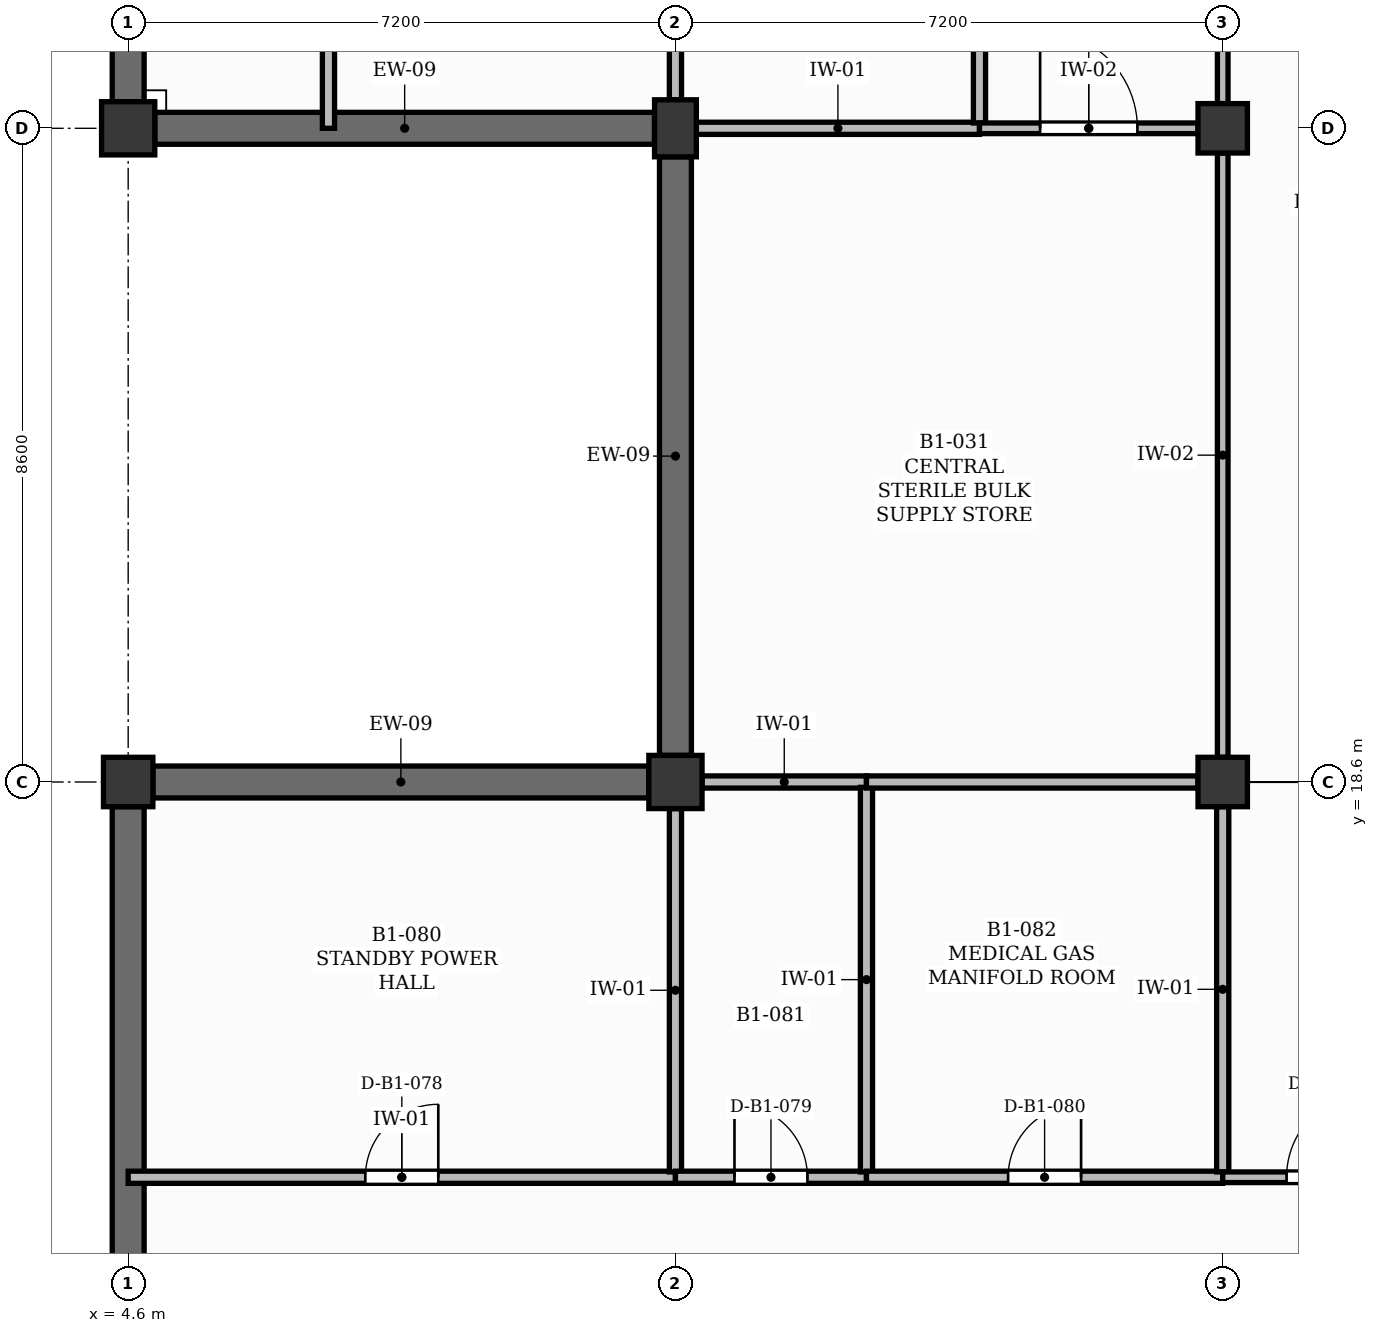
"""IFC4 building model, lengths in metres.
Left out: names, types, materials, properties, quantities, classifications, styles, units other than length and angle.
Written with IfcOpenShell. Run it as: python <this file> out.ifc"""

import sys

from ifc_helpers import new_model, si_unit, direction, frame, frame_2d, origin, origin_2d, place, context, subcontext, project, spatial, rectangle, extrude, element, fill, save


model = new_model("IFC4")
c1 = context("Model", 3, precision=1e-05, world=origin(), true_north=direction((0.0, 1.0)))
c2 = subcontext(c1, "Body", "Model", "MODEL_VIEW")
j1 = project(units=[si_unit("LENGTHUNIT", "METRE"), si_unit("PLANEANGLEUNIT", "RADIAN")], contexts=[c1])
p1 = place(None, origin())
s1 = spatial("IfcSite", under=j1, at=p1, CompositionType="ELEMENT")
p2 = place(p1, origin())
s2 = spatial("IfcBuilding", under=s1, at=p2, CompositionType="ELEMENT")
p3 = place(p2, frame((0.0, 0.0, -4.5)))
s3 = spatial("IfcBuildingStorey", under=s2, at=p3, CompositionType="ELEMENT", Elevation=-4.5)
p4 = place(p3, frame((4.6, 18.6, 0.0), z_axis=(0.0, 0.0, 1.0), x_axis=(1.0, 0.0, 0.0)))
e1 = element("IfcColumn", 1, at=p4, inside=s3, PredefinedType="COLUMN", context=c2, shape_type="SweptSolid", body=[
    extrude(rectangle(XDim=0.65, YDim=0.65, at=origin_2d()), origin(), (0.0, 0.0, 1.0), 4.2),
])
for number, where, z_axis, x_axis in (
    (2, (4.6, 27.2, 0.0), (0.0, 0.0, 1.0), (1.0, 0.0, 0.0)),
    (3, (11.8, 18.6, 0.0), (0.0, 0.0, 1.0), (1.0, 0.0, 0.0)),
):
    element("IfcColumn", number, at=place(p3, frame(where, z_axis=z_axis, x_axis=x_axis)), inside=s3, PredefinedType="COLUMN", context=c2, shape_type="SweptSolid", body=[
        extrude(rectangle(XDim=0.7, YDim=0.7, at=origin_2d()), origin(), (0.0, 0.0, 1.0), 4.2),
    ])
p5 = place(p3, frame((11.8, 27.2, 0.0), z_axis=(0.0, 0.0, 1.0), x_axis=(1.0, 0.0, 0.0)))
e4 = element("IfcColumn", 4, at=p5, inside=s3, PredefinedType="COLUMN", context=c2, shape_type="SweptSolid", body=[
    extrude(rectangle(XDim=0.55, YDim=0.75, at=origin_2d()), origin(), (0.0, 0.0, 1.0), 4.2),
])
for number, where, z_axis, x_axis in (
    (5, (19.0, 18.6, 0.0), (0.0, 0.0, 1.0), (1.0, 0.0, 0.0)),
    (6, (19.0, 27.2, 0.0), (0.0, 0.0, 1.0), (1.0, 0.0, 0.0)),
):
    element("IfcColumn", number, at=place(p3, frame(where, z_axis=z_axis, x_axis=x_axis)), inside=s3, PredefinedType="COLUMN", context=c2, shape_type="SweptSolid", body=[
        extrude(rectangle(XDim=0.65, YDim=0.65, at=origin_2d()), origin(), (0.0, 0.0, 1.0), 4.2),
    ])
p6 = place(p3, frame((4.925, 18.6, 0.0), z_axis=(0.0, 0.0, 1.0), x_axis=(1.0, 0.0, 0.0)))
e7 = element("IfcWall", 7, at=p6, inside=s3, PredefinedType="USERDEFINED", context=c2, shape_type="SweptSolid", body=[
    extrude(rectangle(XDim=6.525, YDim=0.42, at=frame_2d((3.262, 0.0))), origin(), (0.0, 0.0, 1.0), 4.2),
])
p7 = place(p3, frame((4.6, 11.725, 0.0), z_axis=(0.0, 0.0, 1.0), x_axis=(0.0, 1.0, 0.0)))
e8 = element("IfcWall", 8, at=p7, inside=s3, PredefinedType="USERDEFINED", context=c2, shape_type="SweptSolid", body=[
    extrude(rectangle(XDim=6.55, YDim=0.42, at=frame_2d((3.275, 0.0))), origin(), (0.0, 0.0, 1.0), 4.2),
])
p8 = place(p3, frame((4.95, 27.2, 0.0), z_axis=(0.0, 0.0, 1.0), x_axis=(1.0, 0.0, 0.0)))
e9 = element("IfcWall", 9, at=p8, inside=s3, PredefinedType="USERDEFINED", context=c2, shape_type="SweptSolid", body=[
    extrude(rectangle(XDim=6.575, YDim=0.42, at=frame_2d((3.288, 0.0))), origin(), (0.0, 0.0, 1.0), 4.2),
])
p9 = place(p3, frame((4.6, 27.55, 0.0), z_axis=(0.0, 0.0, 1.0), x_axis=(0.0, 1.0, 0.0)))
e10 = element("IfcWall", 10, at=p9, inside=s3, PredefinedType="USERDEFINED", context=c2, shape_type="SweptSolid", body=[
    extrude(rectangle(XDim=8.925, YDim=0.42, at=frame_2d((4.462, 0.0))), origin(), (0.0, 0.0, 1.0), 4.2),
])
p10 = place(p3, frame((11.8, 18.95, 0.0), z_axis=(0.0, 0.0, 1.0), x_axis=(0.0, 1.0, 0.0)))
e11 = element("IfcWall", 11, at=p10, inside=s3, PredefinedType="USERDEFINED", context=c2, shape_type="SweptSolid", body=[
    extrude(rectangle(XDim=7.875, YDim=0.42, at=frame_2d((3.938, 0.0))), origin(), (0.0, 0.0, 1.0), 4.2),
])
p11 = place(p3, frame((4.6, 13.4, 0.0), z_axis=(0.0, 0.0, 1.0), x_axis=(1.0, 0.0, 0.0)))
e12 = element("IfcWall", 12, at=p11, inside=s3, PredefinedType="PARTITIONING", context=c2, shape_type="SweptSolid", body=[
    extrude(rectangle(XDim=7.2, YDim=0.16, at=frame_2d((3.6, 0.0))), origin(), (0.0, 0.0, 1.0), 4.08),
])
p12 = place(p11, frame((3.12, 0.0, 0.0)))
e13 = element("IfcOpeningElement", 13, at=p12, cuts=e12, PredefinedType="OPENING", context=c2, shape_type="SweptSolid", body=[
    extrude(rectangle(XDim=0.96, YDim=2.1, at=frame_2d((0.48, 1.05))), frame((0.0, 0.09, 0.0), z_axis=(0.0, -1.0, 0.0), x_axis=(1.0, 0.0, 0.0)), (0.0, 0.0, 1.0), 0.18),
])
p13 = place(p3, frame((7.235, 27.2, 0.0), z_axis=(0.0, 0.0, 1.0), x_axis=(0.0, 1.0, 0.0)))
e14 = element("IfcWall", 14, at=p13, inside=s3, PredefinedType="PARTITIONING", context=c2, shape_type="SweptSolid", body=[
    extrude(rectangle(XDim=8.23, YDim=0.16, at=frame_2d((4.115, 0.0))), origin(), (0.0, 0.0, 1.0), 4.08),
])
p14 = place(p3, frame((11.8, 13.47, 0.0), z_axis=(0.0, 0.0, 1.0), x_axis=(0.0, 1.0, 0.0)))
e15 = element("IfcWall", 15, at=p14, inside=s3, PredefinedType="PARTITIONING", context=c2, shape_type="SweptSolid", body=[
    extrude(rectangle(XDim=4.78, YDim=0.16, at=frame_2d((2.39, 0.0))), origin(), (0.0, 0.0, 1.0), 3.5),
])
p15 = place(p3, frame((11.8, 13.4, 0.0), z_axis=(0.0, 0.0, 1.0), x_axis=(1.0, 0.0, 0.0)))
e16 = element("IfcWall", 16, at=p15, inside=s3, PredefinedType="PARTITIONING", context=c2, shape_type="SweptSolid", body=[
    extrude(rectangle(XDim=2.513, YDim=0.16, at=frame_2d((1.256, 0.0))), origin(), (0.0, 0.0, 1.0), 4.08),
])
p16 = place(p15, frame((0.777, 0.0, 0.0)))
e17 = element("IfcOpeningElement", 17, at=p16, cuts=e16, PredefinedType="OPENING", context=c2, shape_type="SweptSolid", body=[
    extrude(rectangle(XDim=0.96, YDim=2.1, at=frame_2d((0.48, 1.05))), frame((0.0, 0.09, 0.0), z_axis=(0.0, -1.0, 0.0), x_axis=(1.0, 0.0, 0.0)), (0.0, 0.0, 1.0), 0.18),
])
p17 = place(p3, frame((12.15, 18.6, 0.0), z_axis=(0.0, 0.0, 1.0), x_axis=(1.0, 0.0, 0.0)))
e18 = element("IfcWall", 18, at=p17, inside=s3, PredefinedType="PARTITIONING", context=c2, shape_type="SweptSolid", body=[
    extrude(rectangle(XDim=2.163, YDim=0.16, at=frame_2d((1.082, 0.0))), origin(), (0.0, 0.0, 1.0), 3.5),
])
p18 = place(p3, frame((11.8, 27.575, 0.0), z_axis=(0.0, 0.0, 1.0), x_axis=(0.0, 1.0, 0.0)))
e19 = element("IfcWall", 19, at=p18, inside=s3, PredefinedType="PARTITIONING", context=c2, shape_type="SweptSolid", body=[
    extrude(rectangle(XDim=7.855, YDim=0.16, at=frame_2d((3.927, 0.0))), origin(), (0.0, 0.0, 1.0), 3.4),
])
p19 = place(p3, frame((12.075, 27.2, 0.0), z_axis=(0.0, 0.0, 1.0), x_axis=(1.0, 0.0, 0.0)))
e20 = element("IfcWall", 20, at=p19, inside=s3, PredefinedType="PARTITIONING", context=c2, shape_type="SweptSolid", body=[
    extrude(rectangle(XDim=3.725, YDim=0.16, at=frame_2d((1.863, 0.0))), origin(), (0.0, 0.0, 1.0), 3.6),
])
p20 = place(p3, frame((14.313, 13.47, 0.0), z_axis=(0.0, 0.0, 1.0), x_axis=(0.0, 1.0, 0.0)))
e21 = element("IfcWall", 21, at=p20, inside=s3, PredefinedType="PARTITIONING", context=c2, shape_type="SweptSolid", body=[
    extrude(rectangle(XDim=5.06, YDim=0.16, at=frame_2d((2.53, 0.0))), origin(), (0.0, 0.0, 1.0), 4.08),
])
p21 = place(p3, frame((14.313, 13.4, 0.0), z_axis=(0.0, 0.0, 1.0), x_axis=(1.0, 0.0, 0.0)))
e22 = element("IfcWall", 22, at=p21, inside=s3, PredefinedType="PARTITIONING", context=c2, shape_type="SweptSolid", body=[
    extrude(rectangle(XDim=4.687, YDim=0.16, at=frame_2d((2.344, 0.0))), origin(), (0.0, 0.0, 1.0), 4.08),
])
p22 = place(p21, frame((1.864, 0.0, 0.0)))
e23 = element("IfcOpeningElement", 23, at=p22, cuts=e22, PredefinedType="OPENING", context=c2, shape_type="SweptSolid", body=[
    extrude(rectangle(XDim=0.96, YDim=2.1, at=frame_2d((0.48, 1.05))), frame((0.0, 0.09, 0.0), z_axis=(0.0, -1.0, 0.0), x_axis=(1.0, 0.0, 0.0)), (0.0, 0.0, 1.0), 0.18),
])
p23 = place(p3, frame((14.313, 18.6, 0.0), z_axis=(0.0, 0.0, 1.0), x_axis=(1.0, 0.0, 0.0)))
e24 = element("IfcWall", 24, at=p23, inside=s3, PredefinedType="PARTITIONING", context=c2, shape_type="SweptSolid", body=[
    extrude(rectangle(XDim=4.362, YDim=0.16, at=frame_2d((2.181, 0.0))), origin(), (0.0, 0.0, 1.0), 3.5),
])
p24 = place(p3, frame((15.8, 27.27, 0.0), z_axis=(0.0, 0.0, 1.0), x_axis=(0.0, 1.0, 0.0)))
e25 = element("IfcWall", 25, at=p24, inside=s3, PredefinedType="PARTITIONING", context=c2, shape_type="SweptSolid", body=[
    extrude(rectangle(XDim=8.16, YDim=0.16, at=frame_2d((4.08, 0.0))), origin(), (0.0, 0.0, 1.0), 4.08),
])
p25 = place(p3, frame((15.8, 27.2, 0.0), z_axis=(0.0, 0.0, 1.0), x_axis=(1.0, 0.0, 0.0)))
e26 = element("IfcWall", 26, at=p25, inside=s3, PredefinedType="PARTITIONING", context=c2, shape_type="SweptSolid", body=[
    extrude(rectangle(XDim=2.875, YDim=0.14, at=frame_2d((1.438, 0.0))), origin(), (0.0, 0.0, 1.0), 3.6),
])
p26 = place(p25, frame((0.798, 0.0, 0.0)))
e27 = element("IfcOpeningElement", 27, at=p26, cuts=e26, PredefinedType="OPENING", context=c2, shape_type="SweptSolid", body=[
    extrude(rectangle(XDim=1.28, YDim=2.2, at=frame_2d((0.64, 1.1))), frame((0.0, 0.08, 0.0), z_axis=(0.0, -1.0, 0.0), x_axis=(1.0, 0.0, 0.0)), (0.0, 0.0, 1.0), 0.16),
])
p27 = place(p3, frame((19.0, 13.47, 0.0), z_axis=(0.0, 0.0, 1.0), x_axis=(0.0, 1.0, 0.0)))
e28 = element("IfcWall", 28, at=p27, inside=s3, PredefinedType="PARTITIONING", context=c2, shape_type="SweptSolid", body=[
    extrude(rectangle(XDim=4.805, YDim=0.16, at=frame_2d((2.402, 0.0))), origin(), (0.0, 0.0, 1.0), 3.5),
])
p28 = place(p3, frame((19.0, 13.4, 0.0), z_axis=(0.0, 0.0, 1.0), x_axis=(1.0, 0.0, 0.0)))
e29 = element("IfcWall", 29, at=p28, inside=s3, PredefinedType="PARTITIONING", context=c2, shape_type="SweptSolid", body=[
    extrude(rectangle(XDim=2.8, YDim=0.14, at=frame_2d((1.4, 0.0))), origin(), (0.0, 0.0, 1.0), 4.08),
])
p29 = place(p28, frame((0.84, 0.0, 0.0)))
e30 = element("IfcOpeningElement", 30, at=p29, cuts=e29, PredefinedType="OPENING", context=c2, shape_type="SweptSolid", body=[
    extrude(rectangle(XDim=1.12, YDim=2.15, at=frame_2d((0.56, 1.075))), frame((0.0, 0.08, 0.0), z_axis=(0.0, -1.0, 0.0), x_axis=(1.0, 0.0, 0.0)), (0.0, 0.0, 1.0), 0.16),
])
p30 = place(p3, frame((19.0, 18.925, 0.0), z_axis=(0.0, 0.0, 1.0), x_axis=(0.0, 1.0, 0.0)))
e31 = element("IfcWall", 31, at=p30, inside=s3, PredefinedType="PARTITIONING", context=c2, shape_type="SweptSolid", body=[
    extrude(rectangle(XDim=7.95, YDim=0.14, at=frame_2d((3.975, 0.0))), origin(), (0.0, 0.0, 1.0), 3.5),
])
p31 = place(p3, frame((19.0, 27.525, 0.0), z_axis=(0.0, 0.0, 1.0), x_axis=(0.0, 1.0, 0.0)))
e32 = element("IfcWall", 32, at=p31, inside=s3, PredefinedType="PARTITIONING", context=c2, shape_type="SweptSolid", body=[
    extrude(rectangle(XDim=8.925, YDim=0.14, at=frame_2d((4.462, 0.0))), origin(), (0.0, 0.0, 1.0), 3.4),
])
p32 = place(p31, frame((4.012, 0.0, 0.0)))
e33 = element("IfcOpeningElement", 33, at=p32, cuts=e32, PredefinedType="OPENING", context=c2, shape_type="SweptSolid", body=[
    extrude(rectangle(XDim=0.9, YDim=2.1, at=frame_2d((0.45, 1.05))), frame((0.0, 0.08, 0.0), z_axis=(0.0, -1.0, 0.0), x_axis=(1.0, 0.0, 0.0)), (0.0, 0.0, 1.0), 0.16),
])
p33 = place(p29, origin())
e34 = element("IfcDoor", 34, at=p33, inside=s3, OperationType="SINGLE_SWING_RIGHT", PredefinedType="DOOR", context=c2, shape_type="SweptSolid", body=[
    extrude(rectangle(XDim=1.12, YDim=2.15, at=frame_2d((0.56, 1.075))), frame((0.0, 0.025, 0.0), z_axis=(0.0, -1.0, 0.0), x_axis=(1.0, 0.0, 0.0)), (0.0, 0.0, 1.0), 0.05),
])
fill(e30, e34)
p34 = place(p26, origin())
e35 = element("IfcDoor", 35, at=p34, inside=s3, OperationType="SINGLE_SWING_LEFT", PredefinedType="DOOR", context=c2, shape_type="SweptSolid", body=[
    extrude(rectangle(XDim=1.28, YDim=2.2, at=frame_2d((0.64, 1.1))), frame((0.0, 0.025, 0.0), z_axis=(0.0, -1.0, 0.0), x_axis=(1.0, 0.0, 0.0)), (0.0, 0.0, 1.0), 0.05),
])
fill(e27, e35)
p35 = place(p12, origin())
e36 = element("IfcDoor", 36, at=p35, inside=s3, OperationType="SINGLE_SWING_RIGHT", PredefinedType="DOOR", context=c2, shape_type="SweptSolid", body=[
    extrude(rectangle(XDim=0.96, YDim=2.1, at=frame_2d((0.48, 1.05))), frame((0.0, 0.025, 0.0), z_axis=(0.0, -1.0, 0.0), x_axis=(1.0, 0.0, 0.0)), (0.0, 0.0, 1.0), 0.05),
])
fill(e13, e36)
p36 = place(p16, origin())
e37 = element("IfcDoor", 37, at=p36, inside=s3, OperationType="SINGLE_SWING_LEFT", PredefinedType="DOOR", context=c2, shape_type="SweptSolid", body=[
    extrude(rectangle(XDim=0.96, YDim=2.1, at=frame_2d((0.48, 1.05))), frame((0.0, 0.025, 0.0), z_axis=(0.0, -1.0, 0.0), x_axis=(1.0, 0.0, 0.0)), (0.0, 0.0, 1.0), 0.05),
])
fill(e17, e37)
p37 = place(p22, origin())
e38 = element("IfcDoor", 38, at=p37, inside=s3, OperationType="SINGLE_SWING_RIGHT", PredefinedType="DOOR", context=c2, shape_type="SweptSolid", body=[
    extrude(rectangle(XDim=0.96, YDim=2.1, at=frame_2d((0.48, 1.05))), frame((0.0, 0.025, 0.0), z_axis=(0.0, -1.0, 0.0), x_axis=(1.0, 0.0, 0.0)), (0.0, 0.0, 1.0), 0.05),
])
fill(e23, e38)
save(model, sys.argv[1])
